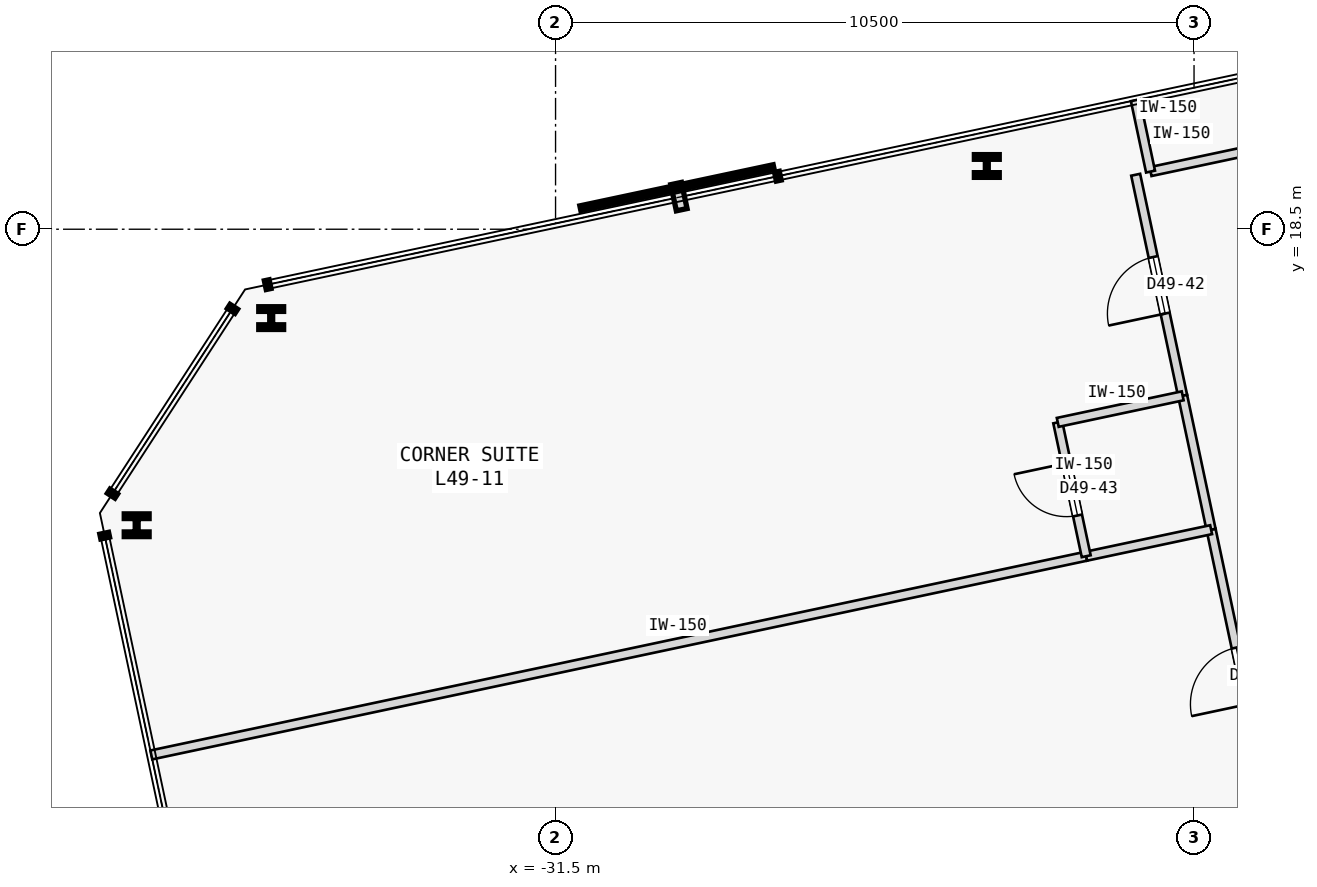
"""IFC4 building model, lengths in metres.
Left out: names, types, materials, properties, quantities, classifications, styles, units other than length and angle.
Written with IfcOpenShell. Run it as: python <this file> out.ifc"""

import sys

from ifc_helpers import new_model, si_unit, direction, frame, frame_2d, origin, origin_2d, place, context, subcontext, project, spatial, rectangle, i_section, extrude, element, fill, save


model = new_model("IFC4")
c1 = context("Model", 3, precision=1e-05, world=origin(), true_north=direction((0.0, 1.0)))
c2 = subcontext(c1, "Body", "Model", "MODEL_VIEW")
j1 = project(units=[si_unit("LENGTHUNIT", "METRE"), si_unit("PLANEANGLEUNIT", "RADIAN")], contexts=[c1])
p1 = place(None, origin())
s1 = spatial("IfcSite", under=j1, at=p1, CompositionType="ELEMENT")
p2 = place(p1, origin())
s2 = spatial("IfcBuilding", under=s1, at=p2, CompositionType="ELEMENT")
p3 = place(p2, frame((0.0, 0.0, 188.8)))
s3 = spatial("IfcBuildingStorey", under=s2, at=p3, CompositionType="ELEMENT", Elevation=188.8)
for number, where, z_axis, x_axis in (
    (1, (-24.408, 19.54, 0.0), (0.0, 0.0, 1.0), (1.0, 0.0, 0.0)),
    (2, (-36.176, 17.039, 0.0), (0.0, 0.0, 1.0), (1.0, 0.0, 0.0)),
    (3, (-38.389, 13.632, 0.0), (0.0, 0.0, 1.0), (1.0, 0.0, 0.0)),
):
    element("IfcColumn", number, at=place(p3, frame(where, z_axis=z_axis, x_axis=x_axis)), inside=s3, PredefinedType="COLUMN", context=c2, shape_type="SweptSolid", body=[
        extrude(i_section(OverallWidth=0.409, OverallDepth=0.374, WebThickness=0.048, FlangeThickness=0.077, FilletRadius=0.015, at=origin_2d()), origin(), (0.0, 0.0, 1.0), 3.4),
    ])
p4 = place(p3, frame((-21.715, 19.448, 0.0), z_axis=(0.0, 0.0, 1.0), x_axis=(0.978160192495, 0.207852442415, 0.0)))
e4 = element("IfcWall", 4, at=p4, inside=s3, PredefinedType="PARTITIONING", context=c2, shape_type="SweptSolid", body=[
    extrude(rectangle(XDim=1.85, YDim=0.15, at=frame_2d((0.925, 0.0))), origin(), (0.0, 0.0, 1.0), 3.175),
])
p5 = place(p3, frame((-19.697, 8.751, 0.0), z_axis=(0.0, 0.0, 1.0), x_axis=(-0.207887265829, 0.978152792107, 0.0)))
e5 = element("IfcWall", 5, at=p5, inside=s3, PredefinedType="PARTITIONING", context=c2, shape_type="SweptSolid", body=[
    extrude(rectangle(XDim=4.916, YDim=0.15, at=frame_2d((2.458, 0.0))), origin(), (0.0, 0.0, 1.0), 3.175),
])
p6 = place(p5, frame((1.983, 0.0, 0.0)))
e6 = element("IfcOpeningElement", 6, at=p6, cuts=e5, PredefinedType="OPENING", context=c2, shape_type="SweptSolid", body=[
    extrude(rectangle(XDim=0.95, YDim=2.15, at=frame_2d((0.475, 1.075))), frame((0.0, 0.085, 0.0), z_axis=(0.0, -1.0, 0.0), x_axis=(1.0, 0.0, 0.0)), (0.0, 0.0, 1.0), 0.17),
])
p7 = place(p3, frame((-21.187, 15.76, 0.0), z_axis=(0.0, 0.0, 1.0), x_axis=(-0.207949879289, 0.978139482745, 0.0)))
e7 = element("IfcWall", 7, at=p7, inside=s3, PredefinedType="PARTITIONING", context=c2, shape_type="SweptSolid", body=[
    extrude(rectangle(XDim=3.717, YDim=0.15, at=frame_2d((1.858, 0.0))), origin(), (0.0, 0.0, 1.0), 3.175),
])
p8 = place(p7, frame((1.384, 0.0, 0.0)))
e8 = element("IfcOpeningElement", 8, at=p8, cuts=e7, PredefinedType="OPENING", context=c2, shape_type="SweptSolid", body=[
    extrude(rectangle(XDim=0.95, YDim=2.15, at=frame_2d((0.475, 1.075))), frame((0.0, 0.085, 0.0), z_axis=(0.0, -1.0, 0.0), x_axis=(1.0, 0.0, 0.0)), (0.0, 0.0, 1.0), 0.17),
])
p9 = place(p3, frame((-20.719, 13.559, 0.0), z_axis=(0.0, 0.0, 1.0), x_axis=(-0.207891197838, 0.978151956427, 0.0)))
e9 = element("IfcWall", 9, at=p9, inside=s3, PredefinedType="PARTITIONING", context=c2, shape_type="SweptSolid", body=[
    extrude(rectangle(XDim=2.25, YDim=0.15, at=frame_2d((1.125, 0.0))), origin(), (0.0, 0.0, 1.0), 3.175),
])
p10 = place(p3, frame((-21.715, 19.448, 0.0), z_axis=(0.0, 0.0, 1.0), x_axis=(-0.20795853359, 0.978137642823, 0.0)))
e10 = element("IfcWall", 10, at=p10, inside=s3, PredefinedType="PARTITIONING", context=c2, shape_type="SweptSolid", body=[
    extrude(rectangle(XDim=1.2, YDim=0.15, at=frame_2d((0.6, 0.0))), origin(), (0.0, 0.0, 1.0), 3.175),
])
p11 = place(p3, frame((-38.148, 9.855, 0.0), z_axis=(0.0, 0.0, 1.0), x_axis=(0.978146137903, 0.207918572776, 0.0)))
e11 = element("IfcWall", 11, at=p11, inside=s3, PredefinedType="PARTITIONING", context=c2, shape_type="SweptSolid", body=[
    extrude(rectangle(XDim=15.718, YDim=0.15, at=frame_2d((7.859, 0.0))), origin(), (0.0, 0.0, 1.0), 3.175),
])
p12 = place(p3, frame((-22.773, 13.123, 0.0), z_axis=(0.0, 0.0, 1.0), x_axis=(0.97815826, 0.207861536591, 0.0)))
e12 = element("IfcWall", 12, at=p12, inside=s3, PredefinedType="PARTITIONING", context=c2, shape_type="SweptSolid", body=[
    extrude(rectangle(XDim=2.1, YDim=0.15, at=frame_2d((1.05, 0.0))), origin(), (0.0, 0.0, 1.0), 3.175),
])
p13 = place(p3, frame((-22.773, 13.123, 0.0), z_axis=(0.0, 0.0, 1.0), x_axis=(-0.207913264065, 0.978147266328, 0.0)))
e13 = element("IfcWall", 13, at=p13, inside=s3, PredefinedType="PARTITIONING", context=c2, shape_type="SweptSolid", body=[
    extrude(rectangle(XDim=2.25, YDim=0.15, at=frame_2d((1.125, 0.0))), origin(), (0.0, 0.0, 1.0), 3.175),
])
p14 = place(p13, frame((0.685, 0.0, 0.0)))
e14 = element("IfcOpeningElement", 14, at=p14, cuts=e13, PredefinedType="OPENING", context=c2, shape_type="SweptSolid", body=[
    extrude(rectangle(XDim=0.88, YDim=2.15, at=frame_2d((0.44, 1.075))), frame((0.0, 0.085, 0.0), z_axis=(0.0, -1.0, 0.0), x_axis=(1.0, 0.0, 0.0)), (0.0, 0.0, 1.0), 0.17),
])
p15 = place(p3, frame((-23.241, 15.323, 0.0), z_axis=(0.0, 0.0, 1.0), x_axis=(0.978134617382, 0.207972763311, 0.0)))
e15 = element("IfcWall", 15, at=p15, inside=s3, PredefinedType="PARTITIONING", context=c2, shape_type="SweptSolid", body=[
    extrude(rectangle(XDim=2.1, YDim=0.15, at=frame_2d((1.05, 0.0))), origin(), (0.0, 0.0, 1.0), 3.175),
])
p16 = place(p6, origin())
e16 = element("IfcDoor", 16, at=p16, inside=s3, OperationType="SINGLE_SWING_LEFT", PredefinedType="DOOR", context=c2, shape_type="SweptSolid", body=[
    extrude(rectangle(XDim=0.95, YDim=2.15, at=frame_2d((0.475, 1.075))), frame((0.0, 0.025, 0.0), z_axis=(0.0, -1.0, 0.0), x_axis=(1.0, 0.0, 0.0)), (0.0, 0.0, 1.0), 0.05),
])
fill(e6, e16)
p17 = place(p8, origin())
e17 = element("IfcDoor", 17, at=p17, inside=s3, OperationType="SINGLE_SWING_LEFT", PredefinedType="DOOR", context=c2, shape_type="SweptSolid", body=[
    extrude(rectangle(XDim=0.95, YDim=2.15, at=frame_2d((0.475, 1.075))), frame((0.0, 0.025, 0.0), z_axis=(0.0, -1.0, 0.0), x_axis=(1.0, 0.0, 0.0)), (0.0, 0.0, 1.0), 0.05),
])
fill(e8, e17)
p18 = place(p14, origin())
e18 = element("IfcDoor", 18, at=p18, inside=s3, OperationType="SINGLE_SWING_RIGHT", PredefinedType="DOOR", context=c2, shape_type="SweptSolid", body=[
    extrude(rectangle(XDim=0.88, YDim=2.15, at=frame_2d((0.44, 1.075))), frame((0.0, 0.025, 0.0), z_axis=(0.0, -1.0, 0.0), x_axis=(1.0, 0.0, 0.0)), (0.0, 0.0, 1.0), 0.05),
])
fill(e14, e18)
save(model, sys.argv[1])
